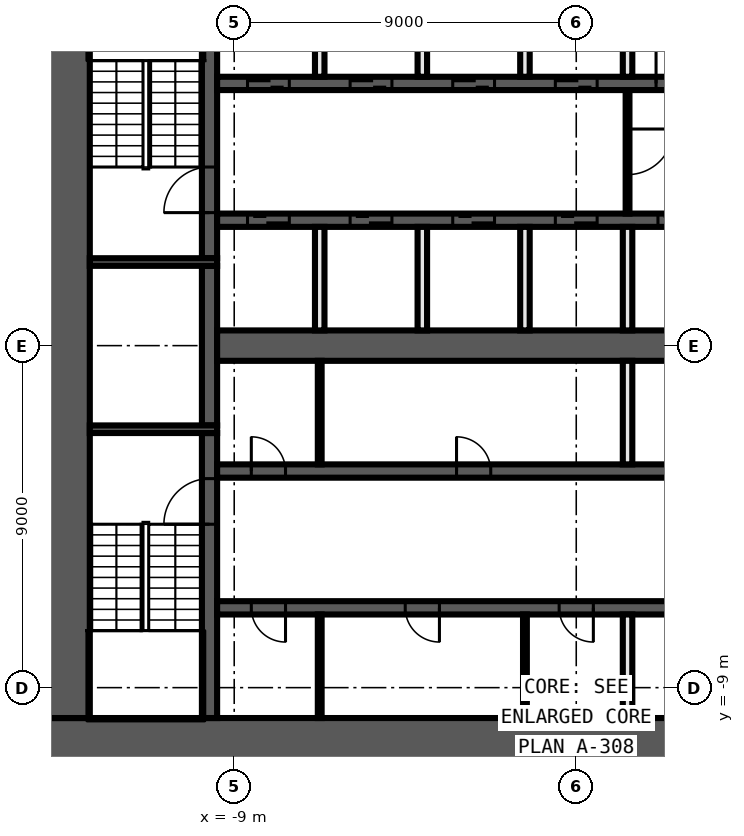
"""IFC4 building model, lengths in metres.
Left out: names, types, materials, properties, quantities, classifications, styles, units other than length and angle.
Written with IfcOpenShell. Run it as: python <this file> out.ifc"""

import sys

from ifc_helpers import new_model, si_unit, direction, frame, frame_2d, origin, place, context, subcontext, project, spatial, rectangle, extrude, element, fill, save


model = new_model("IFC4")
c1 = context("Model", 3, precision=1e-05, world=origin(), true_north=direction((0.0, 1.0)))
c2 = subcontext(c1, "Body", "Model", "MODEL_VIEW")
j1 = project(units=[si_unit("LENGTHUNIT", "METRE"), si_unit("PLANEANGLEUNIT", "RADIAN")], contexts=[c1])
p1 = place(None, origin())
s1 = spatial("IfcSite", under=j1, at=p1, CompositionType="ELEMENT")
p2 = place(p1, origin())
s2 = spatial("IfcBuilding", under=s1, at=p2, CompositionType="ELEMENT")
p3 = place(p2, frame((0.0, 0.0, 58.8)))
s3 = spatial("IfcBuildingStorey", under=s2, at=p3, CompositionType="ELEMENT", Elevation=58.8)
p4 = place(p3, frame((14.0, -10.4, 0.0), z_axis=(0.0, 0.0, 1.0), x_axis=(-1.0, 0.0, 0.0)))
e1 = element("IfcWall", 1, at=p4, inside=s3, PredefinedType="SHEAR", context=c2, shape_type="SweptSolid", body=[
    extrude(rectangle(XDim=28.0, YDim=1.2, at=frame_2d((14.0, 0.0))), origin(), (0.0, 0.0, 1.0), 3.3),
])
p5 = place(p4, frame((5.1, 0.0, 0.0)))
e2 = element("IfcOpeningElement", 2, at=p5, cuts=e1, PredefinedType="OPENING", context=c2, shape_type="SweptSolid", body=[
    extrude(rectangle(XDim=1.6, YDim=2.1, at=frame_2d((0.8, 1.05))), frame((0.0, 0.61, 0.0), z_axis=(0.0, -1.0, 0.0), x_axis=(1.0, 0.0, 0.0)), (0.0, 0.0, 1.0), 1.22),
])
p6 = place(p3, frame((-13.4, -9.8, 0.0), z_axis=(0.0, 0.0, 1.0), x_axis=(0.0, 1.0, 0.0)))
e3 = element("IfcWall", 3, at=p6, inside=s3, PredefinedType="SHEAR", context=c2, shape_type="SweptSolid", body=[
    extrude(rectangle(XDim=19.6, YDim=1.2, at=frame_2d((9.8, 0.0))), origin(), (0.0, 0.0, 1.0), 3.3),
])
p7 = place(p3, frame((-9.65, -9.8, 0.0), z_axis=(0.0, 0.0, 1.0), x_axis=(0.0, 1.0, 0.0)))
e4 = element("IfcWall", 4, at=p7, inside=s3, PredefinedType="SHEAR", context=c2, shape_type="SweptSolid", body=[
    extrude(rectangle(XDim=7.5, YDim=0.4, at=frame_2d((3.75, 0.0))), origin(), (0.0, 0.0, 1.0), 3.3),
])
p8 = place(p7, frame((5.1, 0.0, 0.0)))
e5 = element("IfcOpeningElement", 5, at=p8, cuts=e4, PredefinedType="OPENING", context=c2, shape_type="SweptSolid", body=[
    extrude(rectangle(XDim=1.2, YDim=2.1, at=frame_2d((0.6, 1.05))), frame((0.0, 0.21, 0.0), z_axis=(0.0, -1.0, 0.0), x_axis=(1.0, 0.0, 0.0)), (0.0, 0.0, 1.0), 0.42),
])
p9 = place(p3, frame((-9.65, -2.1, 0.0), z_axis=(0.0, 0.0, 1.0), x_axis=(0.0, 1.0, 0.0)))
e6 = element("IfcWall", 6, at=p9, inside=s3, PredefinedType="SHEAR", context=c2, shape_type="SweptSolid", body=[
    extrude(rectangle(XDim=4.2, YDim=0.4, at=frame_2d((2.1, 0.0))), origin(), (0.0, 0.0, 1.0), 3.3),
])
p10 = place(p3, frame((-9.65, 2.3, 0.0), z_axis=(0.0, 0.0, 1.0), x_axis=(0.0, 1.0, 0.0)))
e7 = element("IfcWall", 7, at=p10, inside=s3, PredefinedType="SHEAR", context=c2, shape_type="SweptSolid", body=[
    extrude(rectangle(XDim=7.5, YDim=0.4, at=frame_2d((3.75, 0.0))), origin(), (0.0, 0.0, 1.0), 3.3),
])
p11 = place(p10, frame((1.2, 0.0, 0.0)))
e8 = element("IfcOpeningElement", 8, at=p11, cuts=e7, PredefinedType="OPENING", context=c2, shape_type="SweptSolid", body=[
    extrude(rectangle(XDim=1.2, YDim=2.1, at=frame_2d((0.6, 1.05))), frame((0.0, 0.21, 0.0), z_axis=(0.0, -1.0, 0.0), x_axis=(1.0, 0.0, 0.0)), (0.0, 0.0, 1.0), 0.42),
])
for number, where, z_axis, x_axis in (
    (9, (-9.45, 2.2, 0.0), (0.0, 0.0, 1.0), (-1.0, 0.0, 0.0)),
    (10, (-9.45, -2.2, 0.0), (0.0, 0.0, 1.0), (-1.0, 0.0, 0.0)),
):
    element("IfcWall", number, at=place(p3, frame(where, z_axis=z_axis, x_axis=x_axis)), inside=s3, PredefinedType="SHEAR", context=c2, shape_type="SweptSolid", body=[
        extrude(rectangle(XDim=3.35, YDim=0.2, at=frame_2d((1.675, 0.0))), origin(), (0.0, 0.0, 1.0), 3.3),
    ])
p12 = place(p3, frame((-9.45, 6.9, 0.0), z_axis=(0.0, 0.0, 1.0), x_axis=(1.0, 0.0, 0.0)))
e11 = element("IfcWall", 11, at=p12, inside=s3, PredefinedType="SHEAR", context=c2, shape_type="SweptSolid", body=[
    extrude(rectangle(XDim=18.9, YDim=0.35, at=frame_2d((9.45, 0.0))), origin(), (0.0, 0.0, 1.0), 3.3),
])
p13 = place(p12, frame((0.8, 0.0, 0.0)))
e12 = element("IfcOpeningElement", 12, at=p13, cuts=e11, PredefinedType="OPENING", context=c2, shape_type="SweptSolid", body=[
    extrude(rectangle(XDim=1.1, YDim=2.1, at=frame_2d((0.55, 1.05))), frame((0.0, 0.185, 0.0), z_axis=(0.0, -1.0, 0.0), x_axis=(1.0, 0.0, 0.0)), (0.0, 0.0, 1.0), 0.37),
])
p14 = place(p12, frame((3.5, 0.0, 0.0)))
e13 = element("IfcOpeningElement", 13, at=p14, cuts=e11, PredefinedType="OPENING", context=c2, shape_type="SweptSolid", body=[
    extrude(rectangle(XDim=1.1, YDim=2.1, at=frame_2d((0.55, 1.05))), frame((0.0, 0.185, 0.0), z_axis=(0.0, -1.0, 0.0), x_axis=(1.0, 0.0, 0.0)), (0.0, 0.0, 1.0), 0.37),
])
p15 = place(p12, frame((6.2, 0.0, 0.0)))
e14 = element("IfcOpeningElement", 14, at=p15, cuts=e11, PredefinedType="OPENING", context=c2, shape_type="SweptSolid", body=[
    extrude(rectangle(XDim=1.1, YDim=2.1, at=frame_2d((0.55, 1.05))), frame((0.0, 0.185, 0.0), z_axis=(0.0, -1.0, 0.0), x_axis=(1.0, 0.0, 0.0)), (0.0, 0.0, 1.0), 0.37),
])
p16 = place(p12, frame((8.9, 0.0, 0.0)))
e15 = element("IfcOpeningElement", 15, at=p16, cuts=e11, PredefinedType="OPENING", context=c2, shape_type="SweptSolid", body=[
    extrude(rectangle(XDim=1.1, YDim=2.1, at=frame_2d((0.55, 1.05))), frame((0.0, 0.185, 0.0), z_axis=(0.0, -1.0, 0.0), x_axis=(1.0, 0.0, 0.0)), (0.0, 0.0, 1.0), 0.37),
])
p17 = place(p12, frame((11.55, 0.0, 0.0)))
e16 = element("IfcOpeningElement", 16, at=p17, cuts=e11, PredefinedType="OPENING", context=c2, shape_type="SweptSolid", body=[
    extrude(rectangle(XDim=1.2, YDim=2.1, at=frame_2d((0.6, 1.05))), frame((0.0, 0.185, 0.0), z_axis=(0.0, -1.0, 0.0), x_axis=(1.0, 0.0, 0.0)), (0.0, 0.0, 1.0), 0.37),
])
p18 = place(p12, frame((14.3, 0.0, 0.0)))
e17 = element("IfcOpeningElement", 17, at=p18, cuts=e11, PredefinedType="OPENING", context=c2, shape_type="SweptSolid", body=[
    extrude(rectangle(XDim=1.1, YDim=2.1, at=frame_2d((0.55, 1.05))), frame((0.0, 0.185, 0.0), z_axis=(0.0, -1.0, 0.0), x_axis=(1.0, 0.0, 0.0)), (0.0, 0.0, 1.0), 0.37),
])
p19 = place(p12, frame((17.0, 0.0, 0.0)))
e18 = element("IfcOpeningElement", 18, at=p19, cuts=e11, PredefinedType="OPENING", context=c2, shape_type="SweptSolid", body=[
    extrude(rectangle(XDim=1.1, YDim=2.1, at=frame_2d((0.55, 1.05))), frame((0.0, 0.185, 0.0), z_axis=(0.0, -1.0, 0.0), x_axis=(1.0, 0.0, 0.0)), (0.0, 0.0, 1.0), 0.37),
])
p20 = place(p3, frame((9.45, 3.3, 0.0), z_axis=(0.0, 0.0, 1.0), x_axis=(-1.0, 0.0, 0.0)))
e19 = element("IfcWall", 19, at=p20, inside=s3, PredefinedType="SHEAR", context=c2, shape_type="SweptSolid", body=[
    extrude(rectangle(XDim=18.9, YDim=0.35, at=frame_2d((9.45, 0.0))), origin(), (0.0, 0.0, 1.0), 3.3),
])
p21 = place(p20, frame((17.0, 0.0, 0.0)))
e20 = element("IfcOpeningElement", 20, at=p21, cuts=e19, PredefinedType="OPENING", context=c2, shape_type="SweptSolid", body=[
    extrude(rectangle(XDim=1.1, YDim=2.1, at=frame_2d((0.55, 1.05))), frame((0.0, 0.185, 0.0), z_axis=(0.0, -1.0, 0.0), x_axis=(1.0, 0.0, 0.0)), (0.0, 0.0, 1.0), 0.37),
])
p22 = place(p20, frame((14.3, 0.0, 0.0)))
e21 = element("IfcOpeningElement", 21, at=p22, cuts=e19, PredefinedType="OPENING", context=c2, shape_type="SweptSolid", body=[
    extrude(rectangle(XDim=1.1, YDim=2.1, at=frame_2d((0.55, 1.05))), frame((0.0, 0.185, 0.0), z_axis=(0.0, -1.0, 0.0), x_axis=(1.0, 0.0, 0.0)), (0.0, 0.0, 1.0), 0.37),
])
p23 = place(p20, frame((11.6, 0.0, 0.0)))
e22 = element("IfcOpeningElement", 22, at=p23, cuts=e19, PredefinedType="OPENING", context=c2, shape_type="SweptSolid", body=[
    extrude(rectangle(XDim=1.1, YDim=2.1, at=frame_2d((0.55, 1.05))), frame((0.0, 0.185, 0.0), z_axis=(0.0, -1.0, 0.0), x_axis=(1.0, 0.0, 0.0)), (0.0, 0.0, 1.0), 0.37),
])
p24 = place(p20, frame((8.9, 0.0, 0.0)))
e23 = element("IfcOpeningElement", 23, at=p24, cuts=e19, PredefinedType="OPENING", context=c2, shape_type="SweptSolid", body=[
    extrude(rectangle(XDim=1.1, YDim=2.1, at=frame_2d((0.55, 1.05))), frame((0.0, 0.185, 0.0), z_axis=(0.0, -1.0, 0.0), x_axis=(1.0, 0.0, 0.0)), (0.0, 0.0, 1.0), 0.37),
])
p25 = place(p20, frame((6.2, 0.0, 0.0)))
e24 = element("IfcOpeningElement", 24, at=p25, cuts=e19, PredefinedType="OPENING", context=c2, shape_type="SweptSolid", body=[
    extrude(rectangle(XDim=1.1, YDim=2.1, at=frame_2d((0.55, 1.05))), frame((0.0, 0.185, 0.0), z_axis=(0.0, -1.0, 0.0), x_axis=(1.0, 0.0, 0.0)), (0.0, 0.0, 1.0), 0.37),
])
p26 = place(p20, frame((3.5, 0.0, 0.0)))
e25 = element("IfcOpeningElement", 25, at=p26, cuts=e19, PredefinedType="OPENING", context=c2, shape_type="SweptSolid", body=[
    extrude(rectangle(XDim=1.1, YDim=2.1, at=frame_2d((0.55, 1.05))), frame((0.0, 0.185, 0.0), z_axis=(0.0, -1.0, 0.0), x_axis=(1.0, 0.0, 0.0)), (0.0, 0.0, 1.0), 0.37),
])
p27 = place(p20, frame((0.9, 0.0, 0.0)))
e26 = element("IfcOpeningElement", 26, at=p27, cuts=e19, PredefinedType="OPENING", context=c2, shape_type="SweptSolid", body=[
    extrude(rectangle(XDim=0.9, YDim=2.1, at=frame_2d((0.45, 1.05))), frame((0.0, 0.185, 0.0), z_axis=(0.0, -1.0, 0.0), x_axis=(1.0, 0.0, 0.0)), (0.0, 0.0, 1.0), 0.37),
])
p28 = place(p3, frame((-9.45, -3.3, 0.0), z_axis=(0.0, 0.0, 1.0), x_axis=(1.0, 0.0, 0.0)))
e27 = element("IfcWall", 27, at=p28, inside=s3, PredefinedType="SHEAR", context=c2, shape_type="SweptSolid", body=[
    extrude(rectangle(XDim=18.9, YDim=0.35, at=frame_2d((9.45, 0.0))), origin(), (0.0, 0.0, 1.0), 3.3),
])
p29 = place(p28, frame((17.0, 0.0, 0.0)))
e28 = element("IfcOpeningElement", 28, at=p29, cuts=e27, PredefinedType="OPENING", context=c2, shape_type="SweptSolid", body=[
    extrude(rectangle(XDim=1.1, YDim=2.1, at=frame_2d((0.55, 1.05))), frame((0.0, 0.185, 0.0), z_axis=(0.0, -1.0, 0.0), x_axis=(1.0, 0.0, 0.0)), (0.0, 0.0, 1.0), 0.37),
])
p30 = place(p28, frame((0.9, 0.0, 0.0)))
e29 = element("IfcOpeningElement", 29, at=p30, cuts=e27, PredefinedType="OPENING", context=c2, shape_type="SweptSolid", body=[
    extrude(rectangle(XDim=0.9, YDim=2.1, at=frame_2d((0.45, 1.05))), frame((0.0, 0.185, 0.0), z_axis=(0.0, -1.0, 0.0), x_axis=(1.0, 0.0, 0.0)), (0.0, 0.0, 1.0), 0.37),
])
p31 = place(p28, frame((6.3, 0.0, 0.0)))
e30 = element("IfcOpeningElement", 30, at=p31, cuts=e27, PredefinedType="OPENING", context=c2, shape_type="SweptSolid", body=[
    extrude(rectangle(XDim=0.9, YDim=2.1, at=frame_2d((0.45, 1.05))), frame((0.0, 0.185, 0.0), z_axis=(0.0, -1.0, 0.0), x_axis=(1.0, 0.0, 0.0)), (0.0, 0.0, 1.0), 0.37),
])
p32 = place(p3, frame((9.45, -6.9, 0.0), z_axis=(0.0, 0.0, 1.0), x_axis=(-1.0, 0.0, 0.0)))
e31 = element("IfcWall", 31, at=p32, inside=s3, PredefinedType="SHEAR", context=c2, shape_type="SweptSolid", body=[
    extrude(rectangle(XDim=18.9, YDim=0.35, at=frame_2d((9.45, 0.0))), origin(), (0.0, 0.0, 1.0), 3.3),
])
p33 = place(p32, frame((0.75, 0.0, 0.0)))
e32 = element("IfcOpeningElement", 32, at=p33, cuts=e31, PredefinedType="OPENING", context=c2, shape_type="SweptSolid", body=[
    extrude(rectangle(XDim=1.2, YDim=2.1, at=frame_2d((0.6, 1.05))), frame((0.0, 0.185, 0.0), z_axis=(0.0, -1.0, 0.0), x_axis=(1.0, 0.0, 0.0)), (0.0, 0.0, 1.0), 0.37),
])
p34 = place(p32, frame((17.1, 0.0, 0.0)))
e33 = element("IfcOpeningElement", 33, at=p34, cuts=e31, PredefinedType="OPENING", context=c2, shape_type="SweptSolid", body=[
    extrude(rectangle(XDim=0.9, YDim=2.1, at=frame_2d((0.45, 1.05))), frame((0.0, 0.185, 0.0), z_axis=(0.0, -1.0, 0.0), x_axis=(1.0, 0.0, 0.0)), (0.0, 0.0, 1.0), 0.37),
])
p35 = place(p32, frame((13.05, 0.0, 0.0)))
e34 = element("IfcOpeningElement", 34, at=p35, cuts=e31, PredefinedType="OPENING", context=c2, shape_type="SweptSolid", body=[
    extrude(rectangle(XDim=0.9, YDim=2.1, at=frame_2d((0.45, 1.05))), frame((0.0, 0.185, 0.0), z_axis=(0.0, -1.0, 0.0), x_axis=(1.0, 0.0, 0.0)), (0.0, 0.0, 1.0), 0.37),
])
p36 = place(p32, frame((9.0, 0.0, 0.0)))
e35 = element("IfcOpeningElement", 35, at=p36, cuts=e31, PredefinedType="OPENING", context=c2, shape_type="SweptSolid", body=[
    extrude(rectangle(XDim=0.9, YDim=2.1, at=frame_2d((0.45, 1.05))), frame((0.0, 0.185, 0.0), z_axis=(0.0, -1.0, 0.0), x_axis=(1.0, 0.0, 0.0)), (0.0, 0.0, 1.0), 0.37),
])
p37 = place(p3, frame((-9.45, 0.0, 0.0), z_axis=(0.0, 0.0, 1.0), x_axis=(1.0, 0.0, 0.0)))
e36 = element("IfcWall", 36, at=p37, inside=s3, PredefinedType="SHEAR", context=c2, shape_type="SweptSolid", body=[
    extrude(rectangle(XDim=18.9, YDim=0.8, at=frame_2d((9.45, 0.0))), origin(), (0.0, 0.0, 1.0), 3.3),
])
p38 = place(p3, frame((1.35, 6.725, 0.0), z_axis=(0.0, 0.0, 1.0), x_axis=(0.0, -1.0, 0.0)))
e37 = element("IfcWall", 37, at=p38, inside=s3, PredefinedType="PARTITIONING", context=c2, shape_type="SweptSolid", body=[
    extrude(rectangle(XDim=3.25, YDim=0.1, at=frame_2d((1.625, 0.0))), origin(), (0.0, 0.0, 1.0), 3.3),
])
p39 = place(p38, frame((1.025, 0.0, 0.0)))
e38 = element("IfcOpeningElement", 38, at=p39, cuts=e37, PredefinedType="OPENING", context=c2, shape_type="SweptSolid", body=[
    extrude(rectangle(XDim=1.2, YDim=2.1, at=frame_2d((0.6, 1.05))), frame((0.0, 0.06, 0.0), z_axis=(0.0, -1.0, 0.0), x_axis=(1.0, 0.0, 0.0)), (0.0, 0.0, 1.0), 0.12),
])
for number, where, z_axis, x_axis in (
    (39, (1.35, -9.8, 0.0), (0.0, 0.0, 1.0), (0.0, 1.0, 0.0)),
    (40, (1.35, -3.125, 0.0), (0.0, 0.0, 1.0), (0.0, 1.0, 0.0)),
    (41, (1.35, 0.4, 0.0), (0.0, 0.0, 1.0), (0.0, 1.0, 0.0)),
    (42, (1.35, 7.075, 0.0), (0.0, 0.0, 1.0), (0.0, 1.0, 0.0)),
):
    element("IfcWall", number, at=place(p3, frame(where, z_axis=z_axis, x_axis=x_axis)), inside=s3, PredefinedType="SOLIDWALL", context=c2, shape_type="SweptSolid", body=[
        extrude(rectangle(XDim=2.725, YDim=0.25, at=frame_2d((1.363, 0.0))), origin(), (0.0, 0.0, 1.0), 3.3),
    ])
p40 = place(p3, frame((-1.35, -9.8, 0.0), z_axis=(0.0, 0.0, 1.0), x_axis=(0.0, 1.0, 0.0)))
e43 = element("IfcWall", 43, at=p40, inside=s3, PredefinedType="PARTITIONING", context=c2, shape_type="SweptSolid", body=[
    extrude(rectangle(XDim=2.725, YDim=0.1, at=frame_2d((1.363, 0.0))), origin(), (0.0, 0.0, 1.0), 3.3),
])
for number, where, z_axis, x_axis in (
    (44, (-1.35, 0.4, 0.0), (0.0, 0.0, 1.0), (0.0, 1.0, 0.0)),
    (45, (-1.35, 7.075, 0.0), (0.0, 0.0, 1.0), (0.0, 1.0, 0.0)),
    (46, (-4.05, 0.4, 0.0), (0.0, 0.0, 1.0), (0.0, 1.0, 0.0)),
    (47, (-4.05, 7.075, 0.0), (0.0, 0.0, 1.0), (0.0, 1.0, 0.0)),
):
    element("IfcWall", number, at=place(p3, frame(where, z_axis=z_axis, x_axis=x_axis)), inside=s3, PredefinedType="SOLIDWALL", context=c2, shape_type="SweptSolid", body=[
        extrude(rectangle(XDim=2.725, YDim=0.25, at=frame_2d((1.363, 0.0))), origin(), (0.0, 0.0, 1.0), 3.3),
    ])
for number, where, z_axis, x_axis in (
    (48, (-6.75, -9.8, 0.0), (0.0, 0.0, 1.0), (0.0, 1.0, 0.0)),
    (49, (-6.75, -3.125, 0.0), (0.0, 0.0, 1.0), (0.0, 1.0, 0.0)),
):
    element("IfcWall", number, at=place(p3, frame(where, z_axis=z_axis, x_axis=x_axis)), inside=s3, PredefinedType="PARTITIONING", context=c2, shape_type="SweptSolid", body=[
        extrude(rectangle(XDim=2.725, YDim=0.1, at=frame_2d((1.363, 0.0))), origin(), (0.0, 0.0, 1.0), 3.3),
    ])
for number, where, z_axis, x_axis in (
    (50, (-6.75, 0.4, 0.0), (0.0, 0.0, 1.0), (0.0, 1.0, 0.0)),
    (51, (-6.75, 7.075, 0.0), (0.0, 0.0, 1.0), (0.0, 1.0, 0.0)),
):
    element("IfcWall", number, at=place(p3, frame(where, z_axis=z_axis, x_axis=x_axis)), inside=s3, PredefinedType="SOLIDWALL", context=c2, shape_type="SweptSolid", body=[
        extrude(rectangle(XDim=2.725, YDim=0.25, at=frame_2d((1.363, 0.0))), origin(), (0.0, 0.0, 1.0), 3.3),
    ])
p41 = place(p13, origin())
e52 = element("IfcDoor", 52, at=p41, inside=s3, OperationType="DOUBLE_DOOR_SLIDING", PredefinedType="DOOR", context=c2, shape_type="SweptSolid", body=[
    extrude(rectangle(XDim=1.1, YDim=2.1, at=frame_2d((0.55, 1.05))), frame((0.0, 0.025, 0.0), z_axis=(0.0, -1.0, 0.0), x_axis=(1.0, 0.0, 0.0)), (0.0, 0.0, 1.0), 0.05),
])
fill(e12, e52)
p42 = place(p14, origin())
e53 = element("IfcDoor", 53, at=p42, inside=s3, OperationType="DOUBLE_DOOR_SLIDING", PredefinedType="DOOR", context=c2, shape_type="SweptSolid", body=[
    extrude(rectangle(XDim=1.1, YDim=2.1, at=frame_2d((0.55, 1.05))), frame((0.0, 0.025, 0.0), z_axis=(0.0, -1.0, 0.0), x_axis=(1.0, 0.0, 0.0)), (0.0, 0.0, 1.0), 0.05),
])
fill(e13, e53)
p43 = place(p15, origin())
e54 = element("IfcDoor", 54, at=p43, inside=s3, OperationType="DOUBLE_DOOR_SLIDING", PredefinedType="DOOR", context=c2, shape_type="SweptSolid", body=[
    extrude(rectangle(XDim=1.1, YDim=2.1, at=frame_2d((0.55, 1.05))), frame((0.0, 0.025, 0.0), z_axis=(0.0, -1.0, 0.0), x_axis=(1.0, 0.0, 0.0)), (0.0, 0.0, 1.0), 0.05),
])
fill(e14, e54)
p44 = place(p16, origin())
e55 = element("IfcDoor", 55, at=p44, inside=s3, OperationType="DOUBLE_DOOR_SLIDING", PredefinedType="DOOR", context=c2, shape_type="SweptSolid", body=[
    extrude(rectangle(XDim=1.1, YDim=2.1, at=frame_2d((0.55, 1.05))), frame((0.0, 0.025, 0.0), z_axis=(0.0, -1.0, 0.0), x_axis=(1.0, 0.0, 0.0)), (0.0, 0.0, 1.0), 0.05),
])
fill(e15, e55)
p45 = place(p17, origin())
e56 = element("IfcDoor", 56, at=p45, inside=s3, OperationType="SINGLE_SWING_LEFT", PredefinedType="DOOR", context=c2, shape_type="SweptSolid", body=[
    extrude(rectangle(XDim=1.2, YDim=2.1, at=frame_2d((0.6, 1.05))), frame((0.0, 0.025, 0.0), z_axis=(0.0, -1.0, 0.0), x_axis=(1.0, 0.0, 0.0)), (0.0, 0.0, 1.0), 0.05),
])
fill(e16, e56)
p46 = place(p21, origin())
e57 = element("IfcDoor", 57, at=p46, inside=s3, OperationType="DOUBLE_DOOR_SLIDING", PredefinedType="DOOR", context=c2, shape_type="SweptSolid", body=[
    extrude(rectangle(XDim=1.1, YDim=2.1, at=frame_2d((0.55, 1.05))), frame((0.0, 0.025, 0.0), z_axis=(0.0, -1.0, 0.0), x_axis=(1.0, 0.0, 0.0)), (0.0, 0.0, 1.0), 0.05),
])
fill(e20, e57)
p47 = place(p22, origin())
e58 = element("IfcDoor", 58, at=p47, inside=s3, OperationType="DOUBLE_DOOR_SLIDING", PredefinedType="DOOR", context=c2, shape_type="SweptSolid", body=[
    extrude(rectangle(XDim=1.1, YDim=2.1, at=frame_2d((0.55, 1.05))), frame((0.0, 0.025, 0.0), z_axis=(0.0, -1.0, 0.0), x_axis=(1.0, 0.0, 0.0)), (0.0, 0.0, 1.0), 0.05),
])
fill(e21, e58)
p48 = place(p23, origin())
e59 = element("IfcDoor", 59, at=p48, inside=s3, OperationType="DOUBLE_DOOR_SLIDING", PredefinedType="DOOR", context=c2, shape_type="SweptSolid", body=[
    extrude(rectangle(XDim=1.1, YDim=2.1, at=frame_2d((0.55, 1.05))), frame((0.0, 0.025, 0.0), z_axis=(0.0, -1.0, 0.0), x_axis=(1.0, 0.0, 0.0)), (0.0, 0.0, 1.0), 0.05),
])
fill(e22, e59)
p49 = place(p24, origin())
e60 = element("IfcDoor", 60, at=p49, inside=s3, OperationType="DOUBLE_DOOR_SLIDING", PredefinedType="DOOR", context=c2, shape_type="SweptSolid", body=[
    extrude(rectangle(XDim=1.1, YDim=2.1, at=frame_2d((0.55, 1.05))), frame((0.0, 0.025, 0.0), z_axis=(0.0, -1.0, 0.0), x_axis=(1.0, 0.0, 0.0)), (0.0, 0.0, 1.0), 0.05),
])
fill(e23, e60)
p50 = place(p25, origin())
e61 = element("IfcDoor", 61, at=p50, inside=s3, OperationType="DOUBLE_DOOR_SLIDING", PredefinedType="DOOR", context=c2, shape_type="SweptSolid", body=[
    extrude(rectangle(XDim=1.1, YDim=2.1, at=frame_2d((0.55, 1.05))), frame((0.0, 0.025, 0.0), z_axis=(0.0, -1.0, 0.0), x_axis=(1.0, 0.0, 0.0)), (0.0, 0.0, 1.0), 0.05),
])
fill(e24, e61)
p51 = place(p30, origin())
e62 = element("IfcDoor", 62, at=p51, inside=s3, OperationType="SINGLE_SWING_RIGHT", PredefinedType="DOOR", context=c2, shape_type="SweptSolid", body=[
    extrude(rectangle(XDim=0.9, YDim=2.1, at=frame_2d((0.45, 1.05))), frame((0.0, 0.025, 0.0), z_axis=(0.0, -1.0, 0.0), x_axis=(1.0, 0.0, 0.0)), (0.0, 0.0, 1.0), 0.05),
])
fill(e29, e62)
p52 = place(p31, origin())
e63 = element("IfcDoor", 63, at=p52, inside=s3, OperationType="SINGLE_SWING_LEFT", PredefinedType="DOOR", context=c2, shape_type="SweptSolid", body=[
    extrude(rectangle(XDim=0.9, YDim=2.1, at=frame_2d((0.45, 1.05))), frame((0.0, 0.025, 0.0), z_axis=(0.0, -1.0, 0.0), x_axis=(1.0, 0.0, 0.0)), (0.0, 0.0, 1.0), 0.05),
])
fill(e30, e63)
p53 = place(p34, origin())
e64 = element("IfcDoor", 64, at=p53, inside=s3, OperationType="SINGLE_SWING_RIGHT", PredefinedType="DOOR", context=c2, shape_type="SweptSolid", body=[
    extrude(rectangle(XDim=0.9, YDim=2.1, at=frame_2d((0.45, 1.05))), frame((0.0, 0.025, 0.0), z_axis=(0.0, -1.0, 0.0), x_axis=(1.0, 0.0, 0.0)), (0.0, 0.0, 1.0), 0.05),
])
fill(e33, e64)
p54 = place(p35, origin())
e65 = element("IfcDoor", 65, at=p54, inside=s3, OperationType="SINGLE_SWING_LEFT", PredefinedType="DOOR", context=c2, shape_type="SweptSolid", body=[
    extrude(rectangle(XDim=0.9, YDim=2.1, at=frame_2d((0.45, 1.05))), frame((0.0, 0.025, 0.0), z_axis=(0.0, -1.0, 0.0), x_axis=(1.0, 0.0, 0.0)), (0.0, 0.0, 1.0), 0.05),
])
fill(e34, e65)
p55 = place(p36, origin())
e66 = element("IfcDoor", 66, at=p55, inside=s3, OperationType="SINGLE_SWING_RIGHT", PredefinedType="DOOR", context=c2, shape_type="SweptSolid", body=[
    extrude(rectangle(XDim=0.9, YDim=2.1, at=frame_2d((0.45, 1.05))), frame((0.0, 0.025, 0.0), z_axis=(0.0, -1.0, 0.0), x_axis=(1.0, 0.0, 0.0)), (0.0, 0.0, 1.0), 0.05),
])
fill(e35, e66)
p56 = place(p11, origin())
e67 = element("IfcDoor", 67, at=p56, inside=s3, OperationType="SINGLE_SWING_RIGHT", PredefinedType="DOOR", context=c2, shape_type="SweptSolid", body=[
    extrude(rectangle(XDim=1.2, YDim=2.1, at=frame_2d((0.6, 1.05))), frame((0.0, 0.025, 0.0), z_axis=(0.0, -1.0, 0.0), x_axis=(1.0, 0.0, 0.0)), (0.0, 0.0, 1.0), 0.05),
])
fill(e8, e67)
p57 = place(p8, origin())
e68 = element("IfcDoor", 68, at=p57, inside=s3, OperationType="SINGLE_SWING_LEFT", PredefinedType="DOOR", context=c2, shape_type="SweptSolid", body=[
    extrude(rectangle(XDim=1.2, YDim=2.1, at=frame_2d((0.6, 1.05))), frame((0.0, 0.025, 0.0), z_axis=(0.0, -1.0, 0.0), x_axis=(1.0, 0.0, 0.0)), (0.0, 0.0, 1.0), 0.05),
])
fill(e5, e68)
p58 = place(p39, origin())
e69 = element("IfcDoor", 69, at=p58, inside=s3, OperationType="SINGLE_SWING_LEFT", PredefinedType="DOOR", context=c2, shape_type="SweptSolid", body=[
    extrude(rectangle(XDim=1.2, YDim=2.1, at=frame_2d((0.6, 1.05))), frame((0.0, 0.025, 0.0), z_axis=(0.0, -1.0, 0.0), x_axis=(1.0, 0.0, 0.0)), (0.0, 0.0, 1.0), 0.05),
])
fill(e38, e69)
save(model, sys.argv[1])
